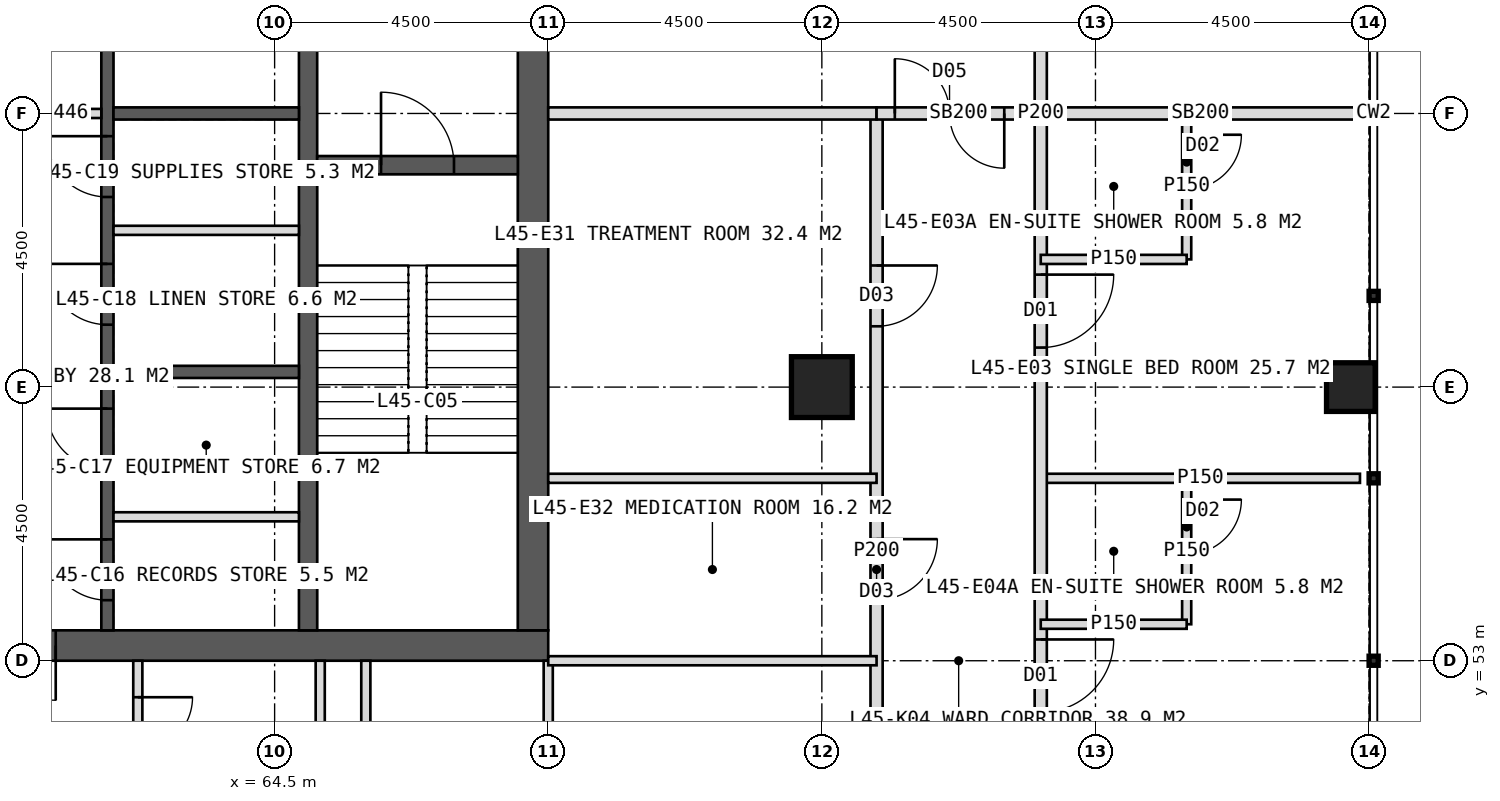
"""IFC4 building model, lengths in metres.
Left out: names, types, materials, properties, quantities, classifications, styles, units other than length and angle.
Written with IfcOpenShell. Run it as: python <this file> out.ifc"""

import sys

from ifc_helpers import new_model, si_unit, direction, frame, frame_2d, origin, origin_2d, place, context, subcontext, project, spatial, rectangle, hollow_rectangle, extrude, element, fill, save


model = new_model("IFC4")
c1 = context("Model", 3, precision=1e-05, world=origin(), true_north=direction((0.0, 1.0)))
c2 = subcontext(c1, "Body", "Model", "MODEL_VIEW")
j1 = project(units=[si_unit("LENGTHUNIT", "METRE"), si_unit("PLANEANGLEUNIT", "RADIAN")], contexts=[c1])
p1 = place(None, origin())
s1 = spatial("IfcSite", under=j1, at=p1, CompositionType="ELEMENT")
p2 = place(p1, origin())
s2 = spatial("IfcBuilding", under=s1, at=p2, CompositionType="ELEMENT")
p3 = place(p2, frame((0.0, 0.0, 189.0)))
s3 = spatial("IfcBuildingStorey", under=s2, at=p3, CompositionType="ELEMENT", Elevation=189.0)
p4 = place(p3, frame((51.0, 53.25, 0.0), z_axis=(0.0, 0.0, 1.0), x_axis=(1.0, 0.0, 0.0)))
e1 = element("IfcWall", 1, at=p4, inside=s3, PredefinedType="SHEAR", context=c2, shape_type="SweptSolid", body=[
    extrude(rectangle(XDim=18.0, YDim=0.5, at=frame_2d((9.0, 0.0))), origin(), (0.0, 0.0, 1.0), 4.0),
])
p5 = place(p4, frame((8.1, 0.0, 0.0)))
e2 = element("IfcOpeningElement", 2, at=p5, cuts=e1, PredefinedType="OPENING", context=c2, shape_type="SweptSolid", body=[
    extrude(rectangle(XDim=1.8, YDim=2.2, at=frame_2d((0.9, 1.1))), frame((0.0, 0.26, 0.0), z_axis=(0.0, -1.0, 0.0), x_axis=(1.0, 0.0, 0.0)), (0.0, 0.0, 1.0), 0.52),
])
p6 = place(p3, frame((68.75, 53.5, 0.0), z_axis=(0.0, 0.0, 1.0), x_axis=(0.0, 1.0, 0.0)))
e3 = element("IfcWall", 3, at=p6, inside=s3, PredefinedType="SHEAR", context=c2, shape_type="SweptSolid", body=[
    extrude(rectangle(XDim=17.0, YDim=0.5, at=frame_2d((8.5, 0.0))), origin(), (0.0, 0.0, 1.0), 4.0),
])
p7 = place(p6, frame((9.6, 0.0, 0.0)))
e4 = element("IfcOpeningElement", 4, at=p7, cuts=e3, PredefinedType="OPENING", context=c2, shape_type="SweptSolid", body=[
    extrude(rectangle(XDim=1.5, YDim=2.2, at=frame_2d((0.75, 1.1))), frame((0.0, 0.26, 0.0), z_axis=(0.0, -1.0, 0.0), x_axis=(1.0, 0.0, 0.0)), (0.0, 0.0, 1.0), 0.52),
])
p8 = place(p3, frame((65.05, 53.5, 0.0), z_axis=(0.0, 0.0, 1.0), x_axis=(0.0, 1.0, 0.0)))
e5 = element("IfcWall", 5, at=p8, inside=s3, PredefinedType="SHEAR", context=c2, shape_type="SweptSolid", body=[
    extrude(rectangle(XDim=17.0, YDim=0.3, at=frame_2d((8.5, 0.0))), origin(), (0.0, 0.0, 1.0), 4.0),
])
p9 = place(p3, frame((61.75, 53.5, 0.0), z_axis=(0.0, 0.0, 1.0), x_axis=(0.0, 1.0, 0.0)))
e6 = element("IfcWall", 6, at=p9, inside=s3, PredefinedType="SHEAR", context=c2, shape_type="SweptSolid", body=[
    extrude(rectangle(XDim=17.0, YDim=0.2, at=frame_2d((8.5, 0.0))), origin(), (0.0, 0.0, 1.0), 4.0),
])
p10 = place(p9, frame((0.496, 0.0, 0.0)))
e7 = element("IfcOpeningElement", 7, at=p10, cuts=e6, PredefinedType="OPENING", context=c2, shape_type="SweptSolid", body=[
    extrude(rectangle(XDim=1.0, YDim=2.1, at=frame_2d((0.5, 1.05))), frame((0.0, 0.11, 0.0), z_axis=(0.0, -1.0, 0.0), x_axis=(1.0, 0.0, 0.0)), (0.0, 0.0, 1.0), 0.22),
])
p11 = place(p9, frame((2.646, 0.0, 0.0)))
e8 = element("IfcOpeningElement", 8, at=p11, cuts=e6, PredefinedType="OPENING", context=c2, shape_type="SweptSolid", body=[
    extrude(rectangle(XDim=1.0, YDim=2.1, at=frame_2d((0.5, 1.05))), frame((0.0, 0.11, 0.0), z_axis=(0.0, -1.0, 0.0), x_axis=(1.0, 0.0, 0.0)), (0.0, 0.0, 1.0), 0.22),
])
p12 = place(p9, frame((5.027, 0.0, 0.0)))
e9 = element("IfcOpeningElement", 9, at=p12, cuts=e6, PredefinedType="OPENING", context=c2, shape_type="SweptSolid", body=[
    extrude(rectangle(XDim=1.0, YDim=2.1, at=frame_2d((0.5, 1.05))), frame((0.0, 0.11, 0.0), z_axis=(0.0, -1.0, 0.0), x_axis=(1.0, 0.0, 0.0)), (0.0, 0.0, 1.0), 0.22),
])
p13 = place(p9, frame((7.126, 0.0, 0.0)))
e10 = element("IfcOpeningElement", 10, at=p13, cuts=e6, PredefinedType="OPENING", context=c2, shape_type="SweptSolid", body=[
    extrude(rectangle(XDim=1.0, YDim=2.1, at=frame_2d((0.5, 1.05))), frame((0.0, 0.11, 0.0), z_axis=(0.0, -1.0, 0.0), x_axis=(1.0, 0.0, 0.0)), (0.0, 0.0, 1.0), 0.22),
])
p14 = place(p9, frame((10.025, 0.0, 0.0)))
e11 = element("IfcOpeningElement", 11, at=p14, cuts=e6, PredefinedType="OPENING", context=c2, shape_type="SweptSolid", body=[
    extrude(rectangle(XDim=1.4, YDim=2.2, at=frame_2d((0.7, 1.1))), frame((0.0, 0.11, 0.0), z_axis=(0.0, -1.0, 0.0), x_axis=(1.0, 0.0, 0.0)), (0.0, 0.0, 1.0), 0.22),
])
p15 = place(p9, frame((14.325, 0.0, 0.0)))
e12 = element("IfcOpeningElement", 12, at=p15, cuts=e6, PredefinedType="OPENING", context=c2, shape_type="SweptSolid", body=[
    extrude(rectangle(XDim=1.4, YDim=2.2, at=frame_2d((0.7, 1.1))), frame((0.0, 0.11, 0.0), z_axis=(0.0, -1.0, 0.0), x_axis=(1.0, 0.0, 0.0)), (0.0, 0.0, 1.0), 0.22),
])
for number, where, z_axis, x_axis in (
    (13, (61.85, 57.75, 0.0), (0.0, 0.0, 1.0), (1.0, 0.0, 0.0)),
    (14, (61.85, 62.0, 0.0), (0.0, 0.0, 1.0), (1.0, 0.0, 0.0)),
):
    element("IfcWall", number, at=place(p3, frame(where, z_axis=z_axis, x_axis=x_axis)), inside=s3, PredefinedType="SHEAR", context=c2, shape_type="SweptSolid", body=[
        extrude(rectangle(XDim=3.05, YDim=0.2, at=frame_2d((1.525, 0.0))), origin(), (0.0, 0.0, 1.0), 4.0),
    ])
p16 = place(p3, frame((65.2, 61.15, 0.0), z_axis=(0.0, 0.0, 1.0), x_axis=(1.0, 0.0, 0.0)))
e15 = element("IfcWall", 15, at=p16, inside=s3, PredefinedType="SHEAR", context=c2, shape_type="SweptSolid", body=[
    extrude(rectangle(XDim=3.3, YDim=0.3, at=frame_2d((1.65, 0.0))), origin(), (0.0, 0.0, 1.0), 4.0),
])
p17 = place(p16, frame((1.05, 0.0, 0.0)))
e16 = element("IfcOpeningElement", 16, at=p17, cuts=e15, PredefinedType="OPENING", context=c2, shape_type="SweptSolid", body=[
    extrude(rectangle(XDim=1.2, YDim=2.1, at=frame_2d((0.6, 1.05))), frame((0.0, 0.16, 0.0), z_axis=(0.0, -1.0, 0.0), x_axis=(1.0, 0.0, 0.0)), (0.0, 0.0, 1.0), 0.32),
])
p18 = place(p3, frame((73.5, 57.5, 0.0), z_axis=(0.0, 0.0, 1.0), x_axis=(1.0, 0.0, 0.0)))
e17 = element("IfcColumn", 17, at=p18, inside=s3, PredefinedType="COLUMN", context=c2, shape_type="SweptSolid", body=[
    extrude(hollow_rectangle(XDim=1.0, YDim=1.0, WallThickness=0.1, at=origin_2d()), origin(), (0.0, 0.0, 1.0), 4.0),
])
p19 = place(p3, frame((82.2, 57.5, 0.0), z_axis=(0.0, 0.0, 1.0), x_axis=(1.0, 0.0, 0.0)))
e18 = element("IfcColumn", 18, at=p19, inside=s3, PredefinedType="COLUMN", context=c2, shape_type="SweptSolid", body=[
    extrude(hollow_rectangle(XDim=0.8, YDim=0.8, WallThickness=0.08, at=origin_2d()), origin(), (0.0, 0.0, 1.0), 4.0),
])
p20 = place(p3, frame((69.0, 53.0, 0.0), z_axis=(0.0, 0.0, 1.0), x_axis=(0.0, -1.0, 0.0)))
e19 = element("IfcWall", 19, at=p20, inside=s3, PredefinedType="PARTITIONING", context=c2, shape_type="SweptSolid", body=[
    extrude(rectangle(XDim=5.4, YDim=0.15, at=frame_2d((2.7, 0.0))), origin(), (0.0, 0.0, 1.0), 3.75),
])
p21 = place(p3, frame((62.25, 53.0, 0.0), z_axis=(0.0, 0.0, 1.0), x_axis=(0.0, -1.0, 0.0)))
e20 = element("IfcWall", 20, at=p21, inside=s3, PredefinedType="PARTITIONING", context=c2, shape_type="SweptSolid", body=[
    extrude(rectangle(XDim=3.9, YDim=0.15, at=frame_2d((1.95, 0.0))), origin(), (0.0, 0.0, 1.0), 3.75),
])
p22 = place(p21, frame((0.6, 0.0, 0.0)))
e21 = element("IfcOpeningElement", 21, at=p22, cuts=e20, PredefinedType="OPENING", context=c2, shape_type="SweptSolid", body=[
    extrude(rectangle(XDim=0.9, YDim=2.1, at=frame_2d((0.45, 1.05))), frame((0.0, 0.085, 0.0), z_axis=(0.0, -1.0, 0.0), x_axis=(1.0, 0.0, 0.0)), (0.0, 0.0, 1.0), 0.17),
])
p23 = place(p3, frame((66.0, 53.0, 0.0), z_axis=(0.0, 0.0, 1.0), x_axis=(0.0, -1.0, 0.0)))
e22 = element("IfcWall", 22, at=p23, inside=s3, PredefinedType="PARTITIONING", context=c2, shape_type="SweptSolid", body=[
    extrude(rectangle(XDim=3.9, YDim=0.15, at=frame_2d((1.95, 0.0))), origin(), (0.0, 0.0, 1.0), 3.75),
])
p24 = place(p3, frame((65.25, 53.0, 0.0), z_axis=(0.0, 0.0, 1.0), x_axis=(0.0, -1.0, 0.0)))
e23 = element("IfcWall", 23, at=p24, inside=s3, PredefinedType="PARTITIONING", context=c2, shape_type="SweptSolid", body=[
    extrude(rectangle(XDim=2.4, YDim=0.15, at=frame_2d((1.2, 0.0))), origin(), (0.0, 0.0, 1.0), 3.75),
])
p25 = place(p3, frame((77.1, 62.0, 0.0), z_axis=(0.0, 0.0, 1.0), x_axis=(1.0, 0.0, 0.0)))
e24 = element("IfcWall", 24, at=p25, inside=s3, PredefinedType="SOLIDWALL", context=c2, shape_type="SweptSolid", body=[
    extrude(rectangle(XDim=5.25, YDim=0.2, at=frame_2d((2.625, 0.0))), origin(), (0.0, 0.0, 1.0), 2.95),
])
p26 = place(p3, frame((77.1, 56.0, 0.0), z_axis=(0.0, 0.0, 1.0), x_axis=(1.0, 0.0, 0.0)))
e25 = element("IfcWall", 25, at=p26, inside=s3, PredefinedType="PARTITIONING", context=c2, shape_type="SweptSolid", body=[
    extrude(rectangle(XDim=5.25, YDim=0.15, at=frame_2d((2.625, 0.0))), origin(), (0.0, 0.0, 1.0), 3.75),
])
p27 = place(p3, frame((77.1, 79.1, 0.0), z_axis=(0.0, 0.0, 1.0), x_axis=(0.0, -1.0, 0.0)))
e26 = element("IfcWall", 26, at=p27, inside=s3, PredefinedType="PARTITIONING", context=c2, shape_type="SweptSolid", body=[
    extrude(rectangle(XDim=34.2, YDim=0.2, at=frame_2d((17.1, 0.0))), origin(), (0.0, 0.0, 1.0), 3.75),
])
p28 = place(p27, frame((3.25, 0.0, 0.0)))
e27 = element("IfcOpeningElement", 27, at=p28, cuts=e26, PredefinedType="OPENING", context=c2, shape_type="SweptSolid", body=[
    extrude(rectangle(XDim=1.2, YDim=2.2, at=frame_2d((0.6, 1.1))), frame((0.0, 0.11, 0.0), z_axis=(0.0, -1.0, 0.0), x_axis=(1.0, 0.0, 0.0)), (0.0, 0.0, 1.0), 0.22),
])
p29 = place(p27, frame((11.35, 0.0, 0.0)))
e28 = element("IfcOpeningElement", 28, at=p29, cuts=e26, PredefinedType="OPENING", context=c2, shape_type="SweptSolid", body=[
    extrude(rectangle(XDim=1.2, YDim=2.2, at=frame_2d((0.6, 1.1))), frame((0.0, 0.11, 0.0), z_axis=(0.0, -1.0, 0.0), x_axis=(1.0, 0.0, 0.0)), (0.0, 0.0, 1.0), 0.22),
])
p30 = place(p27, frame((19.75, 0.0, 0.0)))
e29 = element("IfcOpeningElement", 29, at=p30, cuts=e26, PredefinedType="OPENING", context=c2, shape_type="SweptSolid", body=[
    extrude(rectangle(XDim=1.2, YDim=2.2, at=frame_2d((0.6, 1.1))), frame((0.0, 0.11, 0.0), z_axis=(0.0, -1.0, 0.0), x_axis=(1.0, 0.0, 0.0)), (0.0, 0.0, 1.0), 0.22),
])
p31 = place(p27, frame((25.75, 0.0, 0.0)))
e30 = element("IfcOpeningElement", 30, at=p31, cuts=e26, PredefinedType="OPENING", context=c2, shape_type="SweptSolid", body=[
    extrude(rectangle(XDim=1.2, YDim=2.2, at=frame_2d((0.6, 1.1))), frame((0.0, 0.11, 0.0), z_axis=(0.0, -1.0, 0.0), x_axis=(1.0, 0.0, 0.0)), (0.0, 0.0, 1.0), 0.22),
])
p32 = place(p3, frame((79.5, 62.0, 0.0), z_axis=(0.0, 0.0, 1.0), x_axis=(0.0, -1.0, 0.0)))
e31 = element("IfcWall", 31, at=p32, inside=s3, PredefinedType="PARTITIONING", context=c2, shape_type="SweptSolid", body=[
    extrude(rectangle(XDim=2.4, YDim=0.15, at=frame_2d((1.2, 0.0))), origin(), (0.0, 0.0, 1.0), 3.75),
])
p33 = place(p32, frame((0.35, 0.0, 0.0)))
e32 = element("IfcOpeningElement", 32, at=p33, cuts=e31, PredefinedType="OPENING", context=c2, shape_type="SweptSolid", body=[
    extrude(rectangle(XDim=0.9, YDim=2.1, at=frame_2d((0.45, 1.05))), frame((0.0, 0.085, 0.0), z_axis=(0.0, -1.0, 0.0), x_axis=(1.0, 0.0, 0.0)), (0.0, 0.0, 1.0), 0.17),
])
p34 = place(p3, frame((77.1, 59.6, 0.0), z_axis=(0.0, 0.0, 1.0), x_axis=(1.0, 0.0, 0.0)))
e33 = element("IfcWall", 33, at=p34, inside=s3, PredefinedType="PARTITIONING", context=c2, shape_type="SweptSolid", body=[
    extrude(rectangle(XDim=2.4, YDim=0.15, at=frame_2d((1.2, 0.0))), origin(), (0.0, 0.0, 1.0), 3.75),
])
p35 = place(p3, frame((79.5, 56.0, 0.0), z_axis=(0.0, 0.0, 1.0), x_axis=(0.0, -1.0, 0.0)))
e34 = element("IfcWall", 34, at=p35, inside=s3, PredefinedType="PARTITIONING", context=c2, shape_type="SweptSolid", body=[
    extrude(rectangle(XDim=2.4, YDim=0.15, at=frame_2d((1.2, 0.0))), origin(), (0.0, 0.0, 1.0), 3.75),
])
p36 = place(p35, frame((0.35, 0.0, 0.0)))
e35 = element("IfcOpeningElement", 35, at=p36, cuts=e34, PredefinedType="OPENING", context=c2, shape_type="SweptSolid", body=[
    extrude(rectangle(XDim=0.9, YDim=2.1, at=frame_2d((0.45, 1.05))), frame((0.0, 0.085, 0.0), z_axis=(0.0, -1.0, 0.0), x_axis=(1.0, 0.0, 0.0)), (0.0, 0.0, 1.0), 0.17),
])
p37 = place(p3, frame((77.1, 53.6, 0.0), z_axis=(0.0, 0.0, 1.0), x_axis=(1.0, 0.0, 0.0)))
e36 = element("IfcWall", 36, at=p37, inside=s3, PredefinedType="PARTITIONING", context=c2, shape_type="SweptSolid", body=[
    extrude(rectangle(XDim=2.4, YDim=0.15, at=frame_2d((1.2, 0.0))), origin(), (0.0, 0.0, 1.0), 3.75),
])
p38 = place(p3, frame((74.4, 62.0, 0.0), z_axis=(0.0, 0.0, 1.0), x_axis=(0.0, -1.0, 0.0)))
e37 = element("IfcWall", 37, at=p38, inside=s3, PredefinedType="PARTITIONING", context=c2, shape_type="SweptSolid", body=[
    extrude(rectangle(XDim=14.4, YDim=0.2, at=frame_2d((7.2, 0.0))), origin(), (0.0, 0.0, 1.0), 3.75),
])
p39 = place(p38, frame((2.5, 0.0, 0.0)))
e38 = element("IfcOpeningElement", 38, at=p39, cuts=e37, PredefinedType="OPENING", context=c2, shape_type="SweptSolid", body=[
    extrude(rectangle(XDim=1.0, YDim=2.1, at=frame_2d((0.5, 1.05))), frame((0.0, 0.11, 0.0), z_axis=(0.0, -1.0, 0.0), x_axis=(1.0, 0.0, 0.0)), (0.0, 0.0, 1.0), 0.22),
])
p40 = place(p38, frame((7.0, 0.0, 0.0)))
e39 = element("IfcOpeningElement", 39, at=p40, cuts=e37, PredefinedType="OPENING", context=c2, shape_type="SweptSolid", body=[
    extrude(rectangle(XDim=1.0, YDim=2.1, at=frame_2d((0.5, 1.05))), frame((0.0, 0.11, 0.0), z_axis=(0.0, -1.0, 0.0), x_axis=(1.0, 0.0, 0.0)), (0.0, 0.0, 1.0), 0.22),
])
p41 = place(p38, frame((11.2, 0.0, 0.0)))
e40 = element("IfcOpeningElement", 40, at=p41, cuts=e37, PredefinedType="OPENING", context=c2, shape_type="SweptSolid", body=[
    extrude(rectangle(XDim=1.0, YDim=2.1, at=frame_2d((0.5, 1.05))), frame((0.0, 0.11, 0.0), z_axis=(0.0, -1.0, 0.0), x_axis=(1.0, 0.0, 0.0)), (0.0, 0.0, 1.0), 0.22),
])
p42 = place(p3, frame((69.0, 62.0, 0.0), z_axis=(0.0, 0.0, 1.0), x_axis=(1.0, 0.0, 0.0)))
e41 = element("IfcWall", 41, at=p42, inside=s3, PredefinedType="SOLIDWALL", context=c2, shape_type="SweptSolid", body=[
    extrude(rectangle(XDim=5.4, YDim=0.2, at=frame_2d((2.7, 0.0))), origin(), (0.0, 0.0, 1.0), 2.95),
])
for number, where, z_axis, x_axis in (
    (42, (69.0, 56.0, 0.0), (0.0, 0.0, 1.0), (1.0, 0.0, 0.0)),
    (43, (69.0, 53.0, 0.0), (0.0, 0.0, 1.0), (1.0, 0.0, 0.0)),
):
    element("IfcWall", number, at=place(p3, frame(where, z_axis=z_axis, x_axis=x_axis)), inside=s3, PredefinedType="PARTITIONING", context=c2, shape_type="SweptSolid", body=[
        extrude(rectangle(XDim=5.4, YDim=0.15, at=frame_2d((2.7, 0.0))), origin(), (0.0, 0.0, 1.0), 3.75),
    ])
p43 = place(p3, frame((74.4, 62.0, 0.0), z_axis=(0.0, 0.0, 1.0), x_axis=(1.0, 0.0, 0.0)))
e44 = element("IfcWall", 44, at=p43, inside=s3, PredefinedType="SOLIDWALL", context=c2, shape_type="SweptSolid", body=[
    extrude(rectangle(XDim=2.7, YDim=0.2, at=frame_2d((1.35, 0.0))), origin(), (0.0, 0.0, 1.0), 2.95),
])
p44 = place(p43, frame((0.3, 0.0, 0.0)))
e45 = element("IfcOpeningElement", 45, at=p44, cuts=e44, PredefinedType="OPENING", context=c2, shape_type="SweptSolid", body=[
    extrude(rectangle(XDim=1.8, YDim=2.2, at=frame_2d((0.9, 1.1))), frame((0.0, 0.11, 0.0), z_axis=(0.0, -1.0, 0.0), x_axis=(1.0, 0.0, 0.0)), (0.0, 0.0, 1.0), 0.22),
])
for number, where, z_axis, x_axis in (
    (46, (61.85, 55.367, 0.0), (0.0, 0.0, 1.0), (1.0, 0.0, 0.0)),
    (47, (61.85, 60.078, 0.0), (0.0, 0.0, 1.0), (1.0, 0.0, 0.0)),
):
    element("IfcWall", number, at=place(p3, frame(where, z_axis=z_axis, x_axis=x_axis)), inside=s3, PredefinedType="PARTITIONING", context=c2, shape_type="SweptSolid", body=[
        extrude(rectangle(XDim=3.05, YDim=0.15, at=frame_2d((1.525, 0.0))), origin(), (0.0, 0.0, 1.0), 3.75),
    ])
p45 = place(p3, frame((58.35, 62.0, 0.0), z_axis=(0.0, 0.0, 1.0), x_axis=(1.0, 0.0, 0.0)))
e48 = element("IfcWall", 48, at=p45, inside=s3, PredefinedType="PARTITIONING", context=c2, shape_type="SweptSolid", body=[
    extrude(rectangle(XDim=3.3, YDim=0.15, at=frame_2d((1.65, 0.0))), origin(), (0.0, 0.0, 1.0), 3.75),
])
p46 = place(p22, origin())
e49 = element("IfcDoor", 49, at=p46, inside=s3, OperationType="SINGLE_SWING_LEFT", PredefinedType="DOOR", context=c2, shape_type="SweptSolid", body=[
    extrude(rectangle(XDim=0.9, YDim=2.1, at=frame_2d((0.45, 1.05))), frame((0.0, 0.025, 0.0), z_axis=(0.0, -1.0, 0.0), x_axis=(1.0, 0.0, 0.0)), (0.0, 0.0, 1.0), 0.05),
])
fill(e21, e49)
p47 = place(p30, origin())
e50 = element("IfcDoor", 50, at=p47, inside=s3, OperationType="SINGLE_SWING_LEFT", PredefinedType="DOOR", context=c2, shape_type="SweptSolid", body=[
    extrude(rectangle(XDim=1.2, YDim=2.2, at=frame_2d((0.6, 1.1))), frame((0.0, 0.025, 0.0), z_axis=(0.0, -1.0, 0.0), x_axis=(1.0, 0.0, 0.0)), (0.0, 0.0, 1.0), 0.05),
])
fill(e29, e50)
p48 = place(p33, origin())
e51 = element("IfcDoor", 51, at=p48, inside=s3, OperationType="SINGLE_SWING_LEFT", PredefinedType="DOOR", context=c2, shape_type="SweptSolid", body=[
    extrude(rectangle(XDim=0.9, YDim=2.1, at=frame_2d((0.45, 1.05))), frame((0.0, 0.025, 0.0), z_axis=(0.0, -1.0, 0.0), x_axis=(1.0, 0.0, 0.0)), (0.0, 0.0, 1.0), 0.05),
])
fill(e32, e51)
p49 = place(p31, origin())
e52 = element("IfcDoor", 52, at=p49, inside=s3, OperationType="SINGLE_SWING_LEFT", PredefinedType="DOOR", context=c2, shape_type="SweptSolid", body=[
    extrude(rectangle(XDim=1.2, YDim=2.2, at=frame_2d((0.6, 1.1))), frame((0.0, 0.025, 0.0), z_axis=(0.0, -1.0, 0.0), x_axis=(1.0, 0.0, 0.0)), (0.0, 0.0, 1.0), 0.05),
])
fill(e30, e52)
p50 = place(p36, origin())
e53 = element("IfcDoor", 53, at=p50, inside=s3, OperationType="SINGLE_SWING_LEFT", PredefinedType="DOOR", context=c2, shape_type="SweptSolid", body=[
    extrude(rectangle(XDim=0.9, YDim=2.1, at=frame_2d((0.45, 1.05))), frame((0.0, 0.025, 0.0), z_axis=(0.0, -1.0, 0.0), x_axis=(1.0, 0.0, 0.0)), (0.0, 0.0, 1.0), 0.05),
])
fill(e35, e53)
p51 = place(p39, origin())
e54 = element("IfcDoor", 54, at=p51, inside=s3, OperationType="SINGLE_SWING_LEFT", PredefinedType="DOOR", context=c2, shape_type="SweptSolid", body=[
    extrude(rectangle(XDim=1.0, YDim=2.1, at=frame_2d((0.5, 1.05))), frame((0.0, 0.025, 0.0), z_axis=(0.0, -1.0, 0.0), x_axis=(1.0, 0.0, 0.0)), (0.0, 0.0, 1.0), 0.05),
])
fill(e38, e54)
p52 = place(p40, origin())
e55 = element("IfcDoor", 55, at=p52, inside=s3, OperationType="SINGLE_SWING_LEFT", PredefinedType="DOOR", context=c2, shape_type="SweptSolid", body=[
    extrude(rectangle(XDim=1.0, YDim=2.1, at=frame_2d((0.5, 1.05))), frame((0.0, 0.025, 0.0), z_axis=(0.0, -1.0, 0.0), x_axis=(1.0, 0.0, 0.0)), (0.0, 0.0, 1.0), 0.05),
])
fill(e39, e55)
p53 = place(p44, origin())
e56 = element("IfcDoor", 56, at=p53, inside=s3, OperationType="DOUBLE_DOOR_DOUBLE_SWING", PredefinedType="DOOR", context=c2, shape_type="SweptSolid", body=[
    extrude(rectangle(XDim=1.8, YDim=2.2, at=frame_2d((0.9, 1.1))), frame((0.0, 0.025, 0.0), z_axis=(0.0, -1.0, 0.0), x_axis=(1.0, 0.0, 0.0)), (0.0, 0.0, 1.0), 0.05),
])
fill(e45, e56)
p54 = place(p17, origin())
e57 = element("IfcDoor", 57, at=p54, inside=s3, OperationType="SINGLE_SWING_LEFT", PredefinedType="DOOR", context=c2, shape_type="SweptSolid", body=[
    extrude(rectangle(XDim=1.2, YDim=2.1, at=frame_2d((0.6, 1.05))), frame((0.0, 0.025, 0.0), z_axis=(0.0, -1.0, 0.0), x_axis=(1.0, 0.0, 0.0)), (0.0, 0.0, 1.0), 0.05),
])
fill(e16, e57)
p55 = place(p10, origin())
e58 = element("IfcDoor", 58, at=p55, inside=s3, OperationType="SINGLE_SWING_RIGHT", PredefinedType="DOOR", context=c2, shape_type="SweptSolid", body=[
    extrude(rectangle(XDim=1.0, YDim=2.1, at=frame_2d((0.5, 1.05))), frame((0.0, 0.025, 0.0), z_axis=(0.0, -1.0, 0.0), x_axis=(1.0, 0.0, 0.0)), (0.0, 0.0, 1.0), 0.05),
])
fill(e7, e58)
p56 = place(p11, origin())
e59 = element("IfcDoor", 59, at=p56, inside=s3, OperationType="SINGLE_SWING_RIGHT", PredefinedType="DOOR", context=c2, shape_type="SweptSolid", body=[
    extrude(rectangle(XDim=1.0, YDim=2.1, at=frame_2d((0.5, 1.05))), frame((0.0, 0.025, 0.0), z_axis=(0.0, -1.0, 0.0), x_axis=(1.0, 0.0, 0.0)), (0.0, 0.0, 1.0), 0.05),
])
fill(e8, e59)
p57 = place(p12, origin())
e60 = element("IfcDoor", 60, at=p57, inside=s3, OperationType="SINGLE_SWING_RIGHT", PredefinedType="DOOR", context=c2, shape_type="SweptSolid", body=[
    extrude(rectangle(XDim=1.0, YDim=2.1, at=frame_2d((0.5, 1.05))), frame((0.0, 0.025, 0.0), z_axis=(0.0, -1.0, 0.0), x_axis=(1.0, 0.0, 0.0)), (0.0, 0.0, 1.0), 0.05),
])
fill(e9, e60)
p58 = place(p13, origin())
e61 = element("IfcDoor", 61, at=p58, inside=s3, OperationType="SINGLE_SWING_RIGHT", PredefinedType="DOOR", context=c2, shape_type="SweptSolid", body=[
    extrude(rectangle(XDim=1.0, YDim=2.1, at=frame_2d((0.5, 1.05))), frame((0.0, 0.025, 0.0), z_axis=(0.0, -1.0, 0.0), x_axis=(1.0, 0.0, 0.0)), (0.0, 0.0, 1.0), 0.05),
])
fill(e10, e61)
p59 = place(p5, origin())
e62 = element("IfcDoor", 62, at=p59, inside=s3, OperationType="DOUBLE_DOOR_SINGLE_SWING", PredefinedType="DOOR", context=c2, shape_type="SweptSolid", body=[
    extrude(rectangle(XDim=1.8, YDim=2.2, at=frame_2d((0.9, 1.1))), frame((0.0, 0.025, 0.0), z_axis=(0.0, -1.0, 0.0), x_axis=(1.0, 0.0, 0.0)), (0.0, 0.0, 1.0), 0.05),
])
fill(e2, e62)
save(model, sys.argv[1])
